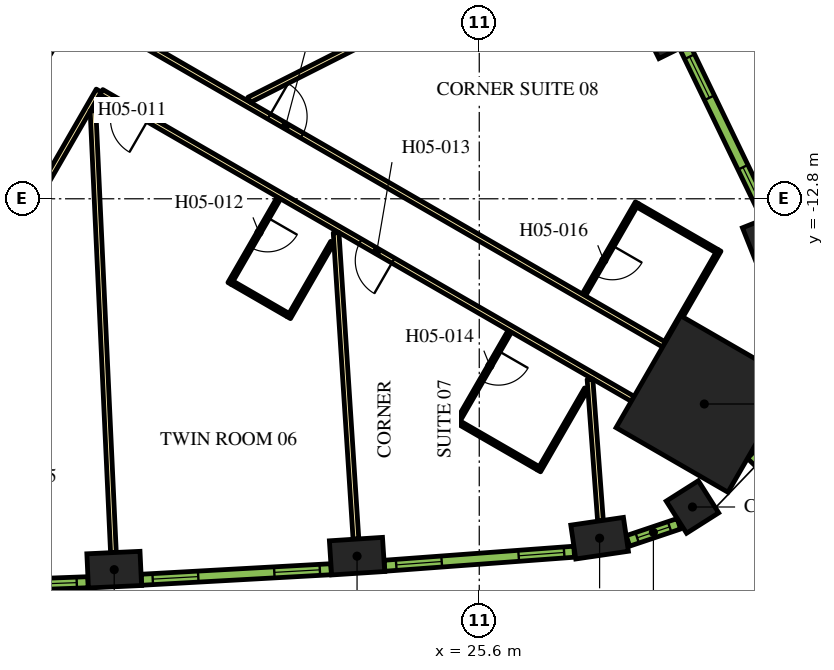
"""IFC4 building model, lengths in metres.
Left out: names, types, materials, properties, quantities, classifications, styles, units other than length and angle.
Written with IfcOpenShell. Run it as: python <this file> out.ifc"""

import sys

from ifc_helpers import new_model, si_unit, direction, frame, frame_2d, origin, origin_2d, place, context, subcontext, project, spatial, rectangle, extrude, element, fill, save


model = new_model("IFC4")
c1 = context("Model", 3, precision=1e-05, world=origin(), true_north=direction((0.0, 1.0)))
c2 = subcontext(c1, "Body", "Model", "MODEL_VIEW")
j1 = project(units=[si_unit("LENGTHUNIT", "METRE"), si_unit("PLANEANGLEUNIT", "RADIAN")], contexts=[c1])
p1 = place(None, origin())
s1 = spatial("IfcSite", under=j1, at=p1, CompositionType="ELEMENT")
p2 = place(p1, origin())
s2 = spatial("IfcBuilding", under=s1, at=p2, CompositionType="ELEMENT")
p3 = place(p2, frame((0.0, 0.0, 74.4)))
s3 = spatial("IfcBuildingStorey", under=s2, at=p3, CompositionType="ELEMENT", Elevation=74.4)
p4 = place(p3, frame((31.522, -18.199, 0.0), z_axis=(0.0, 0.0, 1.0), x_axis=(0.866025403784, -0.5, 0.0)))
e1 = element("IfcColumn", 1, at=p4, inside=s3, PredefinedType="COLUMN", context=c2, shape_type="SweptSolid", body=[
    extrude(rectangle(XDim=3.4, YDim=3.4, at=origin_2d()), origin(), (0.0, 0.0, 1.0), 3.9),
])
for number, where, z_axis, x_axis in (
    (2, (15.994, -22.558, 0.0), (0.0, 0.0, 1.0), (0.999, 0.046, 0.0)),
    (3, (22.385, -22.204, 0.0), (0.0, 0.0, 1.0), (0.998, 0.065, 0.0)),
    (4, (28.767, -21.731, 0.0), (0.0, 0.0, 1.0), (0.989, 0.145, 0.0)),
):
    element("IfcColumn", number, at=place(p3, frame(where, z_axis=z_axis, x_axis=x_axis)), inside=s3, PredefinedType="COLUMN", context=c2, shape_type="SweptSolid", body=[
        extrude(rectangle(XDim=1.4, YDim=0.9, at=origin_2d()), origin(), (0.0, 0.0, 1.0), 3.9),
    ])
p5 = place(p3, frame((31.21, -20.91, 0.0), z_axis=(0.0, 0.0, 1.0), x_axis=(0.844485001826, 0.535579202071, 0.0)))
e5 = element("IfcColumn", 5, at=p5, inside=s3, PredefinedType="COLUMN", context=c2, shape_type="SweptSolid", body=[
    extrude(rectangle(XDim=1.0, YDim=1.0, at=origin_2d()), origin(), (0.0, 0.0, 1.0), 3.9),
])
for number, where, z_axis, x_axis in (
    (6, (33.203, -14.047, 0.0), (0.0, 0.0, 1.0), (-0.369, 0.929, 0.0)),
    (7, (30.421, -8.284, 0.0), (0.0, 0.0, 1.0), (-0.443, 0.897, 0.0)),
):
    element("IfcColumn", number, at=place(p3, frame(where, z_axis=z_axis, x_axis=x_axis)), inside=s3, PredefinedType="COLUMN", context=c2, shape_type="SweptSolid", body=[
        extrude(rectangle(XDim=1.4, YDim=0.9, at=origin_2d()), origin(), (0.0, 0.0, 1.0), 3.9),
    ])
p6 = place(p3, frame((11.695, -12.644, 0.0), z_axis=(0.0, 0.0, 1.0), x_axis=(0.500010229568, 0.86601949766, 0.0)))
e8 = element("IfcWall", 8, at=p6, inside=s3, PredefinedType="SOLIDWALL", context=c2, shape_type="SweptSolid", body=[
    extrude(rectangle(XDim=9.326, YDim=0.9, at=frame_2d((4.663, 0.0))), origin(), (0.0, 0.0, 1.0), 3.9),
])
p7 = place(p3, frame((12.885, -9.431, 0.0), z_axis=(0.0, 0.0, 1.0), x_axis=(0.500020560727, 0.866013532718, 0.0)))
e9 = element("IfcWall", 9, at=p7, inside=s3, PredefinedType="SOLIDWALL", context=c2, shape_type="SweptSolid", body=[
    extrude(rectangle(XDim=3.45, YDim=0.25, at=frame_2d((1.725, 0.0))), origin(), (0.0, 0.0, 1.0), 3.9),
])
p8 = place(p3, frame((16.412, -8.523, 0.0), z_axis=(0.0, 0.0, 1.0), x_axis=(0.866022197818, -0.500005552856, 0.0)))
e10 = element("IfcWall", 10, at=p8, inside=s3, PredefinedType="PARTITIONING", context=c2, shape_type="SweptSolid", body=[
    extrude(rectangle(XDim=16.224, YDim=0.15, at=frame_2d((8.112, 0.0))), origin(), (0.0, 0.0, 1.0), 2.7),
])
p9 = place(p8, frame((4.223, 0.0, 0.0)))
e11 = element("IfcOpeningElement", 11, at=p9, cuts=e10, PredefinedType="OPENING", context=c2, shape_type="SweptSolid", body=[
    extrude(rectangle(XDim=1.0, YDim=2.1, at=frame_2d((0.5, 1.05))), frame((0.0, 0.085, 0.0), z_axis=(0.0, -1.0, 0.0), x_axis=(1.0, 0.0, 0.0)), (0.0, 0.0, 1.0), 0.17),
])
p10 = place(p3, frame((15.587, -9.952, 0.0), z_axis=(0.0, 0.0, 1.0), x_axis=(-0.500016618951, -0.866015808616, 0.0)))
e12 = element("IfcWall", 12, at=p10, inside=s3, PredefinedType="PARTITIONING", context=c2, shape_type="SweptSolid", body=[
    extrude(rectangle(XDim=5.268, YDim=0.15, at=frame_2d((2.634, 0.0))), origin(), (0.0, 0.0, 1.0), 2.7),
])
p11 = place(p3, frame((29.638, -18.064, 0.0), z_axis=(0.0, 0.0, 1.0), x_axis=(-0.866026175601, 0.499998663172, 0.0)))
e13 = element("IfcWall", 13, at=p11, inside=s3, PredefinedType="PARTITIONING", context=c2, shape_type="SweptSolid", body=[
    extrude(rectangle(XDim=16.144, YDim=0.15, at=frame_2d((8.072, 0.0))), origin(), (0.0, 0.0, 1.0), 2.7),
])
p12 = place(p11, frame((14.714, 0.0, 0.0)))
e14 = element("IfcOpeningElement", 14, at=p12, cuts=e13, PredefinedType="OPENING", context=c2, shape_type="SweptSolid", body=[
    extrude(rectangle(XDim=1.0, YDim=2.1, at=frame_2d((0.5, 1.05))), frame((0.0, 0.085, 0.0), z_axis=(0.0, -1.0, 0.0), x_axis=(1.0, 0.0, 0.0)), (0.0, 0.0, 1.0), 0.17),
])
p13 = place(p11, frame((7.275, 0.0, 0.0)))
e15 = element("IfcOpeningElement", 15, at=p13, cuts=e13, PredefinedType="OPENING", context=c2, shape_type="SweptSolid", body=[
    extrude(rectangle(XDim=1.0, YDim=2.1, at=frame_2d((0.5, 1.05))), frame((0.0, 0.085, 0.0), z_axis=(0.0, -1.0, 0.0), x_axis=(1.0, 0.0, 0.0)), (0.0, 0.0, 1.0), 0.17),
])
p14 = place(p3, frame((15.973, -22.109, 0.0), z_axis=(0.0, 0.0, 1.0), x_axis=(-0.046191717129, 0.998932592955, 0.0)))
e16 = element("IfcWall", 16, at=p14, inside=s3, PredefinedType="PARTITIONING", context=c2, shape_type="SweptSolid", body=[
    extrude(rectangle(XDim=11.638, YDim=0.15, at=frame_2d((5.819, 0.0))), origin(), (0.0, 0.0, 1.0), 2.7),
])
p15 = place(p3, frame((29.12, -5.356, 0.0), z_axis=(0.0, 0.0, 1.0), x_axis=(-0.892401965553, -0.451241323327, 0.0)))
e17 = element("IfcWall", 17, at=p15, inside=s3, PredefinedType="PARTITIONING", context=c2, shape_type="SweptSolid", body=[
    extrude(rectangle(XDim=10.729, YDim=0.15, at=frame_2d((5.364, 0.0))), origin(), (0.0, 0.0, 1.0), 2.7),
])
p16 = place(p3, frame((22.355, -21.754, 0.0), z_axis=(0.0, 0.0, 1.0), x_axis=(-0.064639533143, 0.997908678565, 0.0)))
e18 = element("IfcWall", 18, at=p16, inside=s3, PredefinedType="PARTITIONING", context=c2, shape_type="SweptSolid", body=[
    extrude(rectangle(XDim=8.079, YDim=0.15, at=frame_2d((4.04, 0.0))), origin(), (0.0, 0.0, 1.0), 2.7),
])
p17 = place(p3, frame((28.79, -21.273, 0.0), z_axis=(0.0, 0.0, 1.0), x_axis=(-0.07382592098, 0.997271143366, 0.0)))
e19 = element("IfcWall", 19, at=p17, inside=s3, PredefinedType="PARTITIONING", context=c2, shape_type="SweptSolid", body=[
    extrude(rectangle(XDim=3.734, YDim=0.15, at=frame_2d((1.867, 0.0))), origin(), (0.0, 0.0, 1.0), 2.7),
])
p18 = place(p3, frame((20.33, -12.777, 0.0), z_axis=(0.0, 0.0, 1.0), x_axis=(-0.500006934395, -0.866021400173, 0.0)))
e20 = element("IfcWall", 20, at=p18, inside=s3, PredefinedType="PARTITIONING", context=c2, shape_type="SweptSolid", body=[
    extrude(rectangle(XDim=2.6, YDim=0.1, at=frame_2d((1.3, 0.0))), origin(), (0.0, 0.0, 1.0), 2.7),
])
p19 = place(p18, frame((0.6, 0.0, 0.0)))
e21 = element("IfcOpeningElement", 21, at=p19, cuts=e20, PredefinedType="OPENING", context=c2, shape_type="SweptSolid", body=[
    extrude(rectangle(XDim=0.9, YDim=2.1, at=frame_2d((0.45, 1.05))), frame((0.0, 0.06, 0.0), z_axis=(0.0, -1.0, 0.0), x_axis=(1.0, 0.0, 0.0)), (0.0, 0.0, 1.0), 0.12),
])
p20 = place(p3, frame((19.098, -15.01, 0.0), z_axis=(0.0, 0.0, 1.0), x_axis=(0.86605165483, -0.499954529098, 0.0)))
e22 = element("IfcWall", 22, at=p20, inside=s3, PredefinedType="PARTITIONING", context=c2, shape_type="SweptSolid", body=[
    extrude(rectangle(XDim=1.7, YDim=0.1, at=frame_2d((0.85, 0.0))), origin(), (0.0, 0.0, 1.0), 2.7),
])
p21 = place(p3, frame((21.734, -13.945, 0.0), z_axis=(0.0, 0.0, 1.0), x_axis=(-0.500014693593, -0.866016920268, 0.0)))
e23 = element("IfcWall", 23, at=p21, inside=s3, PredefinedType="PARTITIONING", context=c2, shape_type="SweptSolid", body=[
    extrude(rectangle(XDim=2.29, YDim=0.1, at=frame_2d((1.145, 0.0))), origin(), (0.0, 0.0, 1.0), 2.7),
])
p22 = place(p3, frame((26.405, -16.284, 0.0), z_axis=(0.0, 0.0, 1.0), x_axis=(-0.49998411664, -0.866034573852, 0.0)))
e24 = element("IfcWall", 24, at=p22, inside=s3, PredefinedType="PARTITIONING", context=c2, shape_type="SweptSolid", body=[
    extrude(rectangle(XDim=2.8, YDim=0.1, at=frame_2d((1.4, 0.0))), origin(), (0.0, 0.0, 1.0), 2.7),
])
p23 = place(p22, frame((0.6, 0.0, 0.0)))
e25 = element("IfcOpeningElement", 25, at=p23, cuts=e24, PredefinedType="OPENING", context=c2, shape_type="SweptSolid", body=[
    extrude(rectangle(XDim=0.9, YDim=2.1, at=frame_2d((0.45, 1.05))), frame((0.0, 0.06, 0.0), z_axis=(0.0, -1.0, 0.0), x_axis=(1.0, 0.0, 0.0)), (0.0, 0.0, 1.0), 0.12),
])
p24 = place(p3, frame((25.073, -18.691, 0.0), z_axis=(0.0, 0.0, 1.0), x_axis=(0.866024647952, -0.500001309137, 0.0)))
e26 = element("IfcWall", 26, at=p24, inside=s3, PredefinedType="PARTITIONING", context=c2, shape_type="SweptSolid", body=[
    extrude(rectangle(XDim=2.4, YDim=0.1, at=frame_2d((1.2, 0.0))), origin(), (0.0, 0.0, 1.0), 2.7),
])
p25 = place(p3, frame((28.415, -17.802, 0.0), z_axis=(0.0, 0.0, 1.0), x_axis=(-0.499945955465, -0.866056604163, 0.0)))
e27 = element("IfcWall", 27, at=p25, inside=s3, PredefinedType="PARTITIONING", context=c2, shape_type="SweptSolid", body=[
    extrude(rectangle(XDim=2.49, YDim=0.1, at=frame_2d((1.245, 0.0))), origin(), (0.0, 0.0, 1.0), 2.7),
])
p26 = place(p3, frame((29.752, -12.905, 0.0), z_axis=(0.0, 0.0, 1.0), x_axis=(-0.500049511043, -0.865996816683, 0.0)))
e28 = element("IfcWall", 28, at=p26, inside=s3, PredefinedType="PARTITIONING", context=c2, shape_type="SweptSolid", body=[
    extrude(rectangle(XDim=2.8, YDim=0.1, at=frame_2d((1.4, 0.0))), origin(), (0.0, 0.0, 1.0), 2.7),
])
p27 = place(p26, frame((1.3, 0.0, 0.0)))
e29 = element("IfcOpeningElement", 29, at=p27, cuts=e28, PredefinedType="OPENING", context=c2, shape_type="SweptSolid", body=[
    extrude(rectangle(XDim=0.9, YDim=2.1, at=frame_2d((0.45, 1.05))), frame((0.0, 0.06, 0.0), z_axis=(0.0, -1.0, 0.0), x_axis=(1.0, 0.0, 0.0)), (0.0, 0.0, 1.0), 0.12),
])
p28 = place(p3, frame((29.771, -12.973, 0.0), z_axis=(0.0, 0.0, 1.0), x_axis=(0.865980596518, -0.500077600433, 0.0)))
e30 = element("IfcWall", 30, at=p28, inside=s3, PredefinedType="PARTITIONING", context=c2, shape_type="SweptSolid", body=[
    extrude(rectangle(XDim=2.4, YDim=0.1, at=frame_2d((1.2, 0.0))), origin(), (0.0, 0.0, 1.0), 2.7),
])
p29 = place(p3, frame((30.518, -16.58, 0.0), z_axis=(0.0, 0.0, 1.0), x_axis=(0.49998411664, 0.866034573852, 0.0)))
e31 = element("IfcWall", 31, at=p29, inside=s3, PredefinedType="PARTITIONING", context=c2, shape_type="SweptSolid", body=[
    extrude(rectangle(XDim=2.8, YDim=0.1, at=frame_2d((1.4, 0.0))), origin(), (0.0, 0.0, 1.0), 2.7),
])
p30 = place(p3, frame((10.31, -23.074, 0.0), z_axis=(0.0, 0.0, 1.0), x_axis=(0.999317974969, 0.036926750529, 0.0)))
e32 = element("IfcWall", 32, at=p30, inside=s3, PredefinedType="SOLIDWALL", context=c2, shape_type="SweptSolid", body=[
    extrude(rectangle(XDim=4.998, YDim=0.29, at=frame_2d((2.499, 0.0))), origin(), (0.0, 0.0, 1.0), 3.6),
])
p31 = place(p30, frame((0.297, 0.0, 0.9)))
e33 = element("IfcOpeningElement", 33, at=p31, cuts=e32, PredefinedType="OPENING", context=c2, shape_type="SweptSolid", body=[
    extrude(rectangle(XDim=1.2, YDim=2.15, at=frame_2d((0.6, 1.075))), frame((0.0, 0.155, 0.0), z_axis=(0.0, -1.0, 0.0), x_axis=(1.0, 0.0, 0.0)), (0.0, 0.0, 1.0), 0.31),
])
p32 = place(p30, frame((3.501, 0.0, 0.9)))
e34 = element("IfcOpeningElement", 34, at=p32, cuts=e32, PredefinedType="OPENING", context=c2, shape_type="SweptSolid", body=[
    extrude(rectangle(XDim=1.2, YDim=2.15, at=frame_2d((0.6, 1.075))), frame((0.0, 0.155, 0.0), z_axis=(0.0, -1.0, 0.0), x_axis=(1.0, 0.0, 0.0)), (0.0, 0.0, 1.0), 0.31),
])
p33 = place(p3, frame((16.711, -22.824, 0.0), z_axis=(0.0, 0.0, 1.0), x_axis=(0.998464708705, 0.055391564976, 0.0)))
e35 = element("IfcWall", 35, at=p33, inside=s3, PredefinedType="SOLIDWALL", context=c2, shape_type="SweptSolid", body=[
    extrude(rectangle(XDim=4.998, YDim=0.29, at=frame_2d((2.499, 0.0))), origin(), (0.0, 0.0, 1.0), 3.6),
])
p34 = place(p33, frame((0.297, 0.0, 0.9)))
e36 = element("IfcOpeningElement", 36, at=p34, cuts=e35, PredefinedType="OPENING", context=c2, shape_type="SweptSolid", body=[
    extrude(rectangle(XDim=1.2, YDim=2.15, at=frame_2d((0.6, 1.075))), frame((0.0, 0.155, 0.0), z_axis=(0.0, -1.0, 0.0), x_axis=(1.0, 0.0, 0.0)), (0.0, 0.0, 1.0), 0.31),
])
p35 = place(p33, frame((3.501, 0.0, 0.9)))
e37 = element("IfcOpeningElement", 37, at=p35, cuts=e35, PredefinedType="OPENING", context=c2, shape_type="SweptSolid", body=[
    extrude(rectangle(XDim=1.2, YDim=2.15, at=frame_2d((0.6, 1.075))), frame((0.0, 0.155, 0.0), z_axis=(0.0, -1.0, 0.0), x_axis=(1.0, 0.0, 0.0)), (0.0, 0.0, 1.0), 0.31),
])
p36 = place(p3, frame((23.106, -22.456, 0.0), z_axis=(0.0, 0.0, 1.0), x_axis=(0.997266290399, 0.073891447643, 0.0)))
e38 = element("IfcWall", 38, at=p36, inside=s3, PredefinedType="SOLIDWALL", context=c2, shape_type="SweptSolid", body=[
    extrude(rectangle(XDim=5.006, YDim=0.29, at=frame_2d((2.503, 0.0))), origin(), (0.0, 0.0, 1.0), 3.6),
])
p37 = place(p36, frame((0.31, 0.0, 0.9)))
e39 = element("IfcOpeningElement", 39, at=p37, cuts=e38, PredefinedType="OPENING", context=c2, shape_type="SweptSolid", body=[
    extrude(rectangle(XDim=1.2, YDim=2.15, at=frame_2d((0.6, 1.075))), frame((0.0, 0.155, 0.0), z_axis=(0.0, -1.0, 0.0), x_axis=(1.0, 0.0, 0.0)), (0.0, 0.0, 1.0), 0.31),
])
p38 = place(p36, frame((3.54, 0.0, 0.9)))
e40 = element("IfcOpeningElement", 40, at=p38, cuts=e38, PredefinedType="OPENING", context=c2, shape_type="SweptSolid", body=[
    extrude(rectangle(XDim=1.2, YDim=2.15, at=frame_2d((0.6, 1.075))), frame((0.0, 0.155, 0.0), z_axis=(0.0, -1.0, 0.0), x_axis=(1.0, 0.0, 0.0)), (0.0, 0.0, 1.0), 0.31),
])
p39 = place(p3, frame((29.512, -21.802, 0.0), z_axis=(0.0, 0.0, 1.0), x_axis=(0.947903891592, 0.318556450734, 0.0)))
e41 = element("IfcWall", 41, at=p39, inside=s3, PredefinedType="SOLIDWALL", context=c2, shape_type="SweptSolid", body=[
    extrude(rectangle(XDim=1.415, YDim=0.29, at=frame_2d((0.708, 0.0))), origin(), (0.0, 0.0, 1.0), 3.6),
])
p40 = place(p39, frame((0.257, 0.0, 0.9)))
e42 = element("IfcOpeningElement", 42, at=p40, cuts=e41, PredefinedType="OPENING", context=c2, shape_type="SweptSolid", body=[
    extrude(rectangle(XDim=0.9, YDim=2.15, at=frame_2d((0.45, 1.075))), frame((0.0, 0.155, 0.0), z_axis=(0.0, -1.0, 0.0), x_axis=(1.0, 0.0, 0.0)), (0.0, 0.0, 1.0), 0.31),
])
p41 = place(p3, frame((32.762, -19.732, 0.0), z_axis=(0.0, 0.0, 1.0), x_axis=(0.692252359589, 0.721655506903, 0.0)))
e43 = element("IfcWall", 43, at=p41, inside=s3, PredefinedType="SOLIDWALL", context=c2, shape_type="SweptSolid", body=[
    extrude(rectangle(XDim=0.764, YDim=0.29, at=frame_2d((0.382, 0.0))), origin(), (0.0, 0.0, 1.0), 3.6),
])
p42 = place(p3, frame((33.176, -13.29, 0.0), z_axis=(0.0, 0.0, 1.0), x_axis=(-0.434664499056, 0.900592456808, 0.0)))
e44 = element("IfcWall", 44, at=p42, inside=s3, PredefinedType="SOLIDWALL", context=c2, shape_type="SweptSolid", body=[
    extrude(rectangle(XDim=5.006, YDim=0.29, at=frame_2d((2.503, 0.0))), origin(), (0.0, 0.0, 1.0), 3.6),
])
p43 = place(p42, frame((0.265, 0.0, 0.9)))
e45 = element("IfcOpeningElement", 45, at=p43, cuts=e44, PredefinedType="OPENING", context=c2, shape_type="SweptSolid", body=[
    extrude(rectangle(XDim=1.2, YDim=2.15, at=frame_2d((0.6, 1.075))), frame((0.0, 0.155, 0.0), z_axis=(0.0, -1.0, 0.0), x_axis=(1.0, 0.0, 0.0)), (0.0, 0.0, 1.0), 0.31),
])
p44 = place(p42, frame((3.496, 0.0, 0.9)))
e46 = element("IfcOpeningElement", 46, at=p44, cuts=e44, PredefinedType="OPENING", context=c2, shape_type="SweptSolid", body=[
    extrude(rectangle(XDim=1.2, YDim=2.15, at=frame_2d((0.6, 1.075))), frame((0.0, 0.155, 0.0), z_axis=(0.0, -1.0, 0.0), x_axis=(1.0, 0.0, 0.0)), (0.0, 0.0, 1.0), 0.31),
])
p45 = place(p12, origin())
e47 = element("IfcDoor", 47, at=p45, inside=s3, OperationType="SINGLE_SWING_RIGHT", PredefinedType="DOOR", context=c2, shape_type="SweptSolid", body=[
    extrude(rectangle(XDim=1.0, YDim=2.1, at=frame_2d((0.5, 1.05))), frame((0.0, 0.025, 0.0), z_axis=(0.0, -1.0, 0.0), x_axis=(1.0, 0.0, 0.0)), (0.0, 0.0, 1.0), 0.05),
])
fill(e14, e47)
p46 = place(p19, origin())
e48 = element("IfcDoor", 48, at=p46, inside=s3, OperationType="SINGLE_SWING_RIGHT", PredefinedType="DOOR", context=c2, shape_type="SweptSolid", body=[
    extrude(rectangle(XDim=0.9, YDim=2.1, at=frame_2d((0.45, 1.05))), frame((0.0, 0.025, 0.0), z_axis=(0.0, -1.0, 0.0), x_axis=(1.0, 0.0, 0.0)), (0.0, 0.0, 1.0), 0.05),
])
fill(e21, e48)
p47 = place(p13, origin())
e49 = element("IfcDoor", 49, at=p47, inside=s3, OperationType="SINGLE_SWING_RIGHT", PredefinedType="DOOR", context=c2, shape_type="SweptSolid", body=[
    extrude(rectangle(XDim=1.0, YDim=2.1, at=frame_2d((0.5, 1.05))), frame((0.0, 0.025, 0.0), z_axis=(0.0, -1.0, 0.0), x_axis=(1.0, 0.0, 0.0)), (0.0, 0.0, 1.0), 0.05),
])
fill(e15, e49)
p48 = place(p23, origin())
e50 = element("IfcDoor", 50, at=p48, inside=s3, OperationType="SINGLE_SWING_LEFT", PredefinedType="DOOR", context=c2, shape_type="SweptSolid", body=[
    extrude(rectangle(XDim=0.9, YDim=2.1, at=frame_2d((0.45, 1.05))), frame((0.0, 0.025, 0.0), z_axis=(0.0, -1.0, 0.0), x_axis=(1.0, 0.0, 0.0)), (0.0, 0.0, 1.0), 0.05),
])
fill(e25, e50)
p49 = place(p9, origin())
e51 = element("IfcDoor", 51, at=p49, inside=s3, OperationType="SINGLE_SWING_LEFT", PredefinedType="DOOR", context=c2, shape_type="SweptSolid", body=[
    extrude(rectangle(XDim=1.0, YDim=2.1, at=frame_2d((0.5, 1.05))), frame((0.0, 0.025, 0.0), z_axis=(0.0, -1.0, 0.0), x_axis=(1.0, 0.0, 0.0)), (0.0, 0.0, 1.0), 0.05),
])
fill(e11, e51)
p50 = place(p27, origin())
e52 = element("IfcDoor", 52, at=p50, inside=s3, OperationType="SINGLE_SWING_LEFT", PredefinedType="DOOR", context=c2, shape_type="SweptSolid", body=[
    extrude(rectangle(XDim=0.9, YDim=2.1, at=frame_2d((0.45, 1.05))), frame((0.0, 0.025, 0.0), z_axis=(0.0, -1.0, 0.0), x_axis=(1.0, 0.0, 0.0)), (0.0, 0.0, 1.0), 0.05),
])
fill(e29, e52)
p51 = place(p32, origin())
e53 = element("IfcWindow", 53, at=p51, inside=s3, PartitioningType="DOUBLE_PANEL_VERTICAL", PredefinedType="WINDOW", context=c2, shape_type="SweptSolid", body=[
    extrude(rectangle(XDim=1.2, YDim=2.15, at=frame_2d((0.6, 1.075))), frame((0.0, 0.015, 0.0), z_axis=(0.0, -1.0, 0.0), x_axis=(1.0, 0.0, 0.0)), (0.0, 0.0, 1.0), 0.06),
])
fill(e34, e53)
p52 = place(p34, origin())
e54 = element("IfcWindow", 54, at=p52, inside=s3, PartitioningType="DOUBLE_PANEL_VERTICAL", PredefinedType="WINDOW", context=c2, shape_type="SweptSolid", body=[
    extrude(rectangle(XDim=1.2, YDim=2.15, at=frame_2d((0.6, 1.075))), frame((0.0, 0.015, 0.0), z_axis=(0.0, -1.0, 0.0), x_axis=(1.0, 0.0, 0.0)), (0.0, 0.0, 1.0), 0.06),
])
fill(e36, e54)
p53 = place(p35, origin())
e55 = element("IfcWindow", 55, at=p53, inside=s3, PartitioningType="DOUBLE_PANEL_VERTICAL", PredefinedType="WINDOW", context=c2, shape_type="SweptSolid", body=[
    extrude(rectangle(XDim=1.2, YDim=2.15, at=frame_2d((0.6, 1.075))), frame((0.0, 0.015, 0.0), z_axis=(0.0, -1.0, 0.0), x_axis=(1.0, 0.0, 0.0)), (0.0, 0.0, 1.0), 0.06),
])
fill(e37, e55)
p54 = place(p37, origin())
e56 = element("IfcWindow", 56, at=p54, inside=s3, PartitioningType="DOUBLE_PANEL_VERTICAL", PredefinedType="WINDOW", context=c2, shape_type="SweptSolid", body=[
    extrude(rectangle(XDim=1.2, YDim=2.15, at=frame_2d((0.6, 1.075))), frame((0.0, 0.015, 0.0), z_axis=(0.0, -1.0, 0.0), x_axis=(1.0, 0.0, 0.0)), (0.0, 0.0, 1.0), 0.06),
])
fill(e39, e56)
p55 = place(p38, origin())
e57 = element("IfcWindow", 57, at=p55, inside=s3, PartitioningType="DOUBLE_PANEL_VERTICAL", PredefinedType="WINDOW", context=c2, shape_type="SweptSolid", body=[
    extrude(rectangle(XDim=1.2, YDim=2.15, at=frame_2d((0.6, 1.075))), frame((0.0, 0.015, 0.0), z_axis=(0.0, -1.0, 0.0), x_axis=(1.0, 0.0, 0.0)), (0.0, 0.0, 1.0), 0.06),
])
fill(e40, e57)
p56 = place(p40, origin())
e58 = element("IfcWindow", 58, at=p56, inside=s3, PartitioningType="SINGLE_PANEL", PredefinedType="WINDOW", context=c2, shape_type="SweptSolid", body=[
    extrude(rectangle(XDim=0.9, YDim=2.15, at=frame_2d((0.45, 1.075))), frame((0.0, 0.015, 0.0), z_axis=(0.0, -1.0, 0.0), x_axis=(1.0, 0.0, 0.0)), (0.0, 0.0, 1.0), 0.06),
])
fill(e42, e58)
p57 = place(p43, origin())
e59 = element("IfcWindow", 59, at=p57, inside=s3, PartitioningType="DOUBLE_PANEL_VERTICAL", PredefinedType="WINDOW", context=c2, shape_type="SweptSolid", body=[
    extrude(rectangle(XDim=1.2, YDim=2.15, at=frame_2d((0.6, 1.075))), frame((0.0, 0.015, 0.0), z_axis=(0.0, -1.0, 0.0), x_axis=(1.0, 0.0, 0.0)), (0.0, 0.0, 1.0), 0.06),
])
fill(e45, e59)
p58 = place(p44, origin())
e60 = element("IfcWindow", 60, at=p58, inside=s3, PartitioningType="DOUBLE_PANEL_VERTICAL", PredefinedType="WINDOW", context=c2, shape_type="SweptSolid", body=[
    extrude(rectangle(XDim=1.2, YDim=2.15, at=frame_2d((0.6, 1.075))), frame((0.0, 0.015, 0.0), z_axis=(0.0, -1.0, 0.0), x_axis=(1.0, 0.0, 0.0)), (0.0, 0.0, 1.0), 0.06),
])
fill(e46, e60)
save(model, sys.argv[1])
